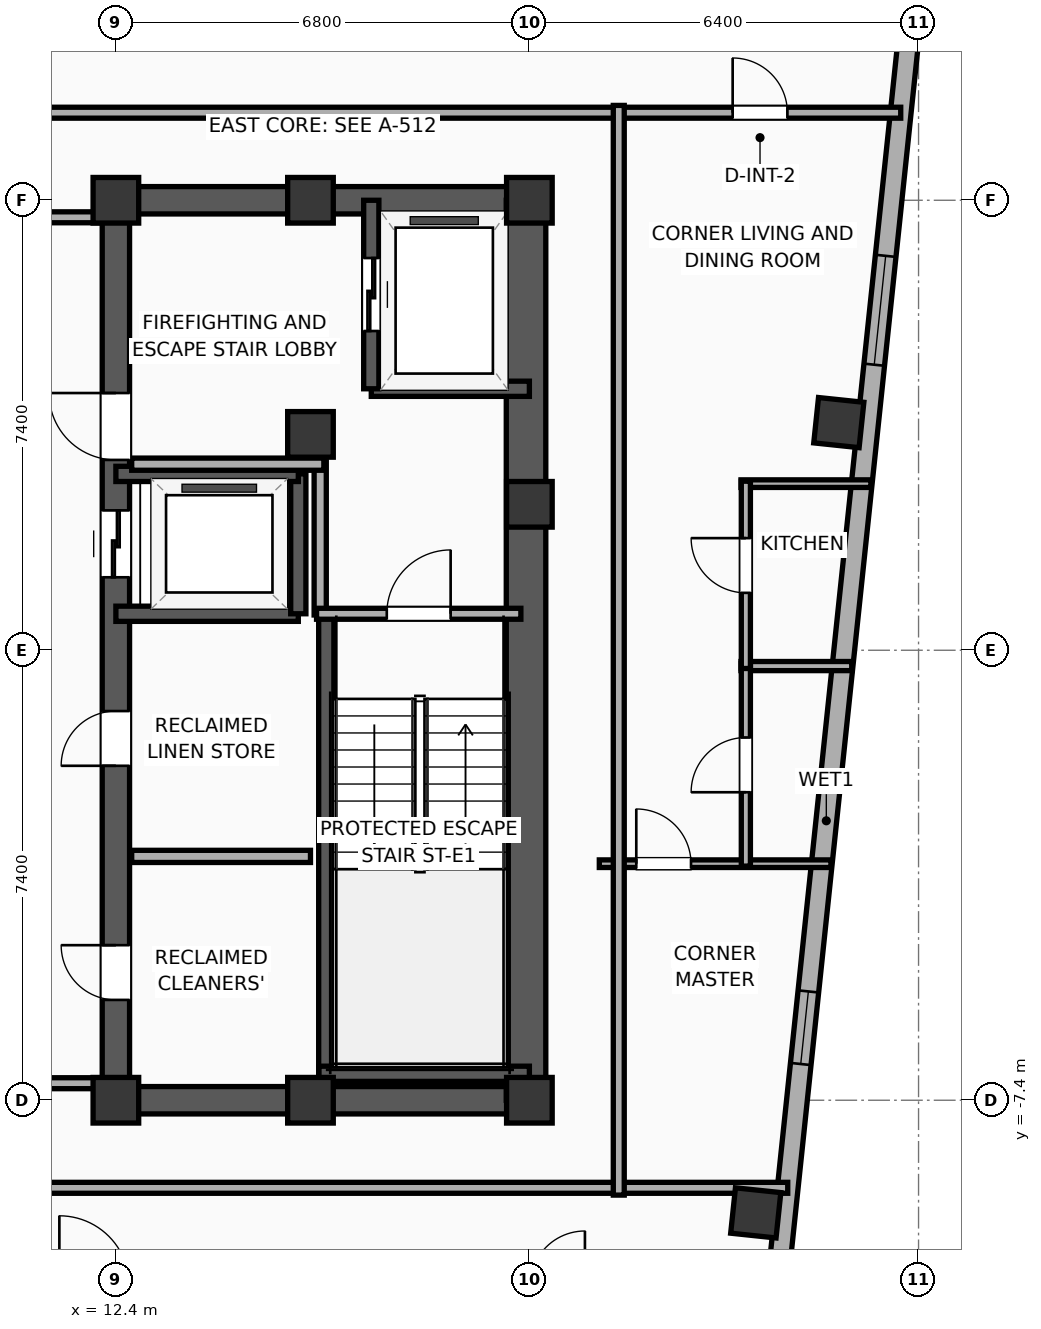
"""IFC4 building model, lengths in metres.
Left out: names, types, materials, properties, quantities, classifications, styles, units other than length and angle.
Written with IfcOpenShell. Run it as: python <this file> out.ifc"""

import sys

from ifc_helpers import new_model, si_unit, direction, frame, frame_2d, origin, origin_2d, place, context, subcontext, project, spatial, rectangle, hollow_rectangle, extrude, element, fill, save


model = new_model("IFC4")
c1 = context("Model", 3, precision=1e-05, world=origin(), true_north=direction((0.0, 1.0)))
c2 = subcontext(c1, "Body", "Model", "MODEL_VIEW")
j1 = project(units=[si_unit("LENGTHUNIT", "METRE"), si_unit("PLANEANGLEUNIT", "RADIAN")], contexts=[c1])
p1 = place(None, origin())
s1 = spatial("IfcSite", under=j1, at=p1, CompositionType="ELEMENT")
p2 = place(p1, origin())
s2 = spatial("IfcBuilding", under=s1, at=p2, CompositionType="ELEMENT")
p3 = place(p2, frame((0.0, 0.0, 263.9)))
s3 = spatial("IfcBuildingStorey", under=s2, at=p3, CompositionType="ELEMENT", Elevation=263.9)
for number, where, z_axis, x_axis in (
    (1, (12.4, -7.4, 0.0), (0.0, 0.0, 1.0), (1.0, 0.0, 0.0)),
    (2, (15.6, 3.55, 0.0), (0.0, 0.0, 1.0), (1.0, 0.0, 0.0)),
    (3, (12.4, 7.4, 0.0), (0.0, 0.0, 1.0), (1.0, 0.0, 0.0)),
    (4, (15.6, -7.4, 0.0), (0.0, 0.0, 1.0), (1.0, 0.0, 0.0)),
    (5, (15.6, 7.4, 0.0), (0.0, 0.0, 1.0), (1.0, 0.0, 0.0)),
    (6, (19.2, -7.4, 0.0), (0.0, 0.0, 1.0), (1.0, 0.0, 0.0)),
    (7, (19.2, 2.4, 0.0), (0.0, 0.0, 1.0), (1.0, 0.0, 0.0)),
    (8, (19.2, 7.4, 0.0), (0.0, 0.0, 1.0), (1.0, 0.0, 0.0)),
):
    element("IfcColumn", number, at=place(p3, frame(where, z_axis=z_axis, x_axis=x_axis)), inside=s3, PredefinedType="COLUMN", context=c2, shape_type="SweptSolid", body=[
        extrude(rectangle(XDim=0.75, YDim=0.75, at=origin_2d()), origin(), (0.0, 0.0, 1.0), 3.9),
    ])
for number, where, z_axis, x_axis in (
    (9, (12.175, -7.4, 0.0), (0.0, 0.0, 1.0), (1.0, 0.0, 0.0)),
    (10, (12.175, 7.4, 0.0), (0.0, 0.0, 1.0), (1.0, 0.0, 0.0)),
):
    element("IfcWall", number, at=place(p3, frame(where, z_axis=z_axis, x_axis=x_axis)), inside=s3, PredefinedType="SHEAR", context=c2, shape_type="SweptSolid", body=[
        extrude(rectangle(XDim=7.25, YDim=0.45, at=frame_2d((3.625, 0.0))), origin(), (0.0, 0.0, 1.0), 3.65),
    ])
p4 = place(p3, frame((12.4, -7.4, 0.0), z_axis=(0.0, 0.0, 1.0), x_axis=(0.0, 1.0, 0.0)))
e11 = element("IfcWall", 11, at=p4, inside=s3, PredefinedType="SHEAR", context=c2, shape_type="SweptSolid", body=[
    extrude(rectangle(XDim=14.8, YDim=0.45, at=frame_2d((7.4, 0.0))), origin(), (0.0, 0.0, 1.0), 3.65),
])
p5 = place(p4, frame((8.6, 0.0, 0.0)))
e12 = element("IfcOpeningElement", 12, at=p5, cuts=e11, PredefinedType="OPENING", context=c2, shape_type="SweptSolid", body=[
    extrude(rectangle(XDim=1.1, YDim=2.05, at=frame_2d((0.55, 1.025))), frame((0.0, 0.235, 0.0), z_axis=(0.0, -1.0, 0.0), x_axis=(1.0, 0.0, 0.0)), (0.0, 0.0, 1.0), 0.47),
])
p6 = place(p4, frame((10.53, 0.0, 0.0)))
e13 = element("IfcOpeningElement", 13, at=p6, cuts=e11, PredefinedType="OPENING", context=c2, shape_type="SweptSolid", body=[
    extrude(rectangle(XDim=1.1, YDim=2.05, at=frame_2d((0.55, 1.025))), frame((0.0, 0.235, 0.0), z_axis=(0.0, -1.0, 0.0), x_axis=(1.0, 0.0, 0.0)), (0.0, 0.0, 1.0), 0.47),
])
p7 = place(p4, frame((1.65, 0.0, 0.0)))
e14 = element("IfcOpeningElement", 14, at=p7, cuts=e11, PredefinedType="OPENING", context=c2, shape_type="SweptSolid", body=[
    extrude(rectangle(XDim=0.9, YDim=2.05, at=frame_2d((0.45, 1.025))), frame((0.0, 0.235, 0.0), z_axis=(0.0, -1.0, 0.0), x_axis=(1.0, 0.0, 0.0)), (0.0, 0.0, 1.0), 0.47),
])
p8 = place(p4, frame((5.5, 0.0, 0.0)))
e15 = element("IfcOpeningElement", 15, at=p8, cuts=e11, PredefinedType="OPENING", context=c2, shape_type="SweptSolid", body=[
    extrude(rectangle(XDim=0.9, YDim=2.05, at=frame_2d((0.45, 1.025))), frame((0.0, 0.235, 0.0), z_axis=(0.0, -1.0, 0.0), x_axis=(1.0, 0.0, 0.0)), (0.0, 0.0, 1.0), 0.47),
])
p9 = place(p3, frame((19.145, -7.4, 0.0), z_axis=(0.0, 0.0, 1.0), x_axis=(0.0, 1.0, 0.0)))
e16 = element("IfcWall", 16, at=p9, inside=s3, PredefinedType="SHEAR", context=c2, shape_type="SweptSolid", body=[
    extrude(rectangle(XDim=14.8, YDim=0.65, at=frame_2d((7.4, 0.0))), origin(), (0.0, 0.0, 1.0), 3.65),
])
p10 = place(p3, frame((15.86, -7.085, 0.0), z_axis=(0.0, 0.0, 1.0), x_axis=(0.0, 1.0, 0.0)))
e17 = element("IfcWall", 17, at=p10, inside=s3, PredefinedType="SOLIDWALL", context=c2, shape_type="SweptSolid", body=[
    extrude(rectangle(XDim=7.685, YDim=0.25, at=frame_2d((3.843, 0.0))), origin(), (0.0, 0.0, 1.0), 3.65),
])
p11 = place(p3, frame((15.74, -6.965, 0.0), z_axis=(0.0, 0.0, 1.0), x_axis=(1.0, 0.0, 0.0)))
e18 = element("IfcWall", 18, at=p11, inside=s3, PredefinedType="SOLIDWALL", context=c2, shape_type="SweptSolid", body=[
    extrude(rectangle(XDim=3.46, YDim=0.25, at=frame_2d((1.73, 0.0))), origin(), (0.0, 0.0, 1.0), 3.65),
])
for number, where, z_axis, x_axis in (
    (19, (22.923, -9.252, 0.0), (0.0, 0.0, 1.0), (0.995, -0.105, 0.0)),
    (20, (24.289, 3.744, 0.0), (0.0, 0.0, 1.0), (0.995, -0.105, 0.0)),
):
    element("IfcColumn", number, at=place(p3, frame(where, z_axis=z_axis, x_axis=x_axis)), inside=s3, PredefinedType="COLUMN", context=c2, shape_type="SweptSolid", body=[
        extrude(hollow_rectangle(XDim=0.75, YDim=0.75, WallThickness=0.025, at=origin_2d()), origin(), (0.0, 0.0, 1.0), 3.9),
    ])
p12 = place(p3, frame((25.67, 12.296, 0.0), z_axis=(0.0, 0.0, 1.0), x_axis=(-0.104533282919, -0.994521388791, 0.0)))
e21 = element("IfcWall", 21, at=p12, inside=s3, PredefinedType="ELEMENTEDWALL", context=c2, shape_type="SweptSolid", body=[
    extrude(rectangle(XDim=30.366, YDim=0.34, at=frame_2d((15.183, 0.0))), origin(), (0.0, 0.0, 1.0), 3.65),
])
p13 = place(p12, frame((5.842, 0.0, 0.75)))
e22 = element("IfcOpeningElement", 22, at=p13, cuts=e21, PredefinedType="OPENING", context=c2, shape_type="SweptSolid", body=[
    extrude(rectangle(XDim=1.8, YDim=2.1, at=frame_2d((0.9, 1.05))), frame((0.0, 0.18, 0.0), z_axis=(0.0, -1.0, 0.0), x_axis=(1.0, 0.0, 0.0)), (0.0, 0.0, 1.0), 0.36),
])
p14 = place(p12, frame((18.005, 0.0, 0.75)))
e23 = element("IfcOpeningElement", 23, at=p14, cuts=e21, PredefinedType="OPENING", context=c2, shape_type="SweptSolid", body=[
    extrude(rectangle(XDim=1.2, YDim=2.05, at=frame_2d((0.6, 1.025))), frame((0.0, 0.18, 0.0), z_axis=(0.0, -1.0, 0.0), x_axis=(1.0, 0.0, 0.0)), (0.0, 0.0, 1.0), 0.36),
])
p15 = place(p3, frame((16.6, 4.3, 0.0), z_axis=(0.0, 0.0, 1.0), x_axis=(1.0, 0.0, 0.0)))
e24 = element("IfcWall", 24, at=p15, inside=s3, PredefinedType="SOLIDWALL", context=c2, shape_type="SweptSolid", body=[
    extrude(rectangle(XDim=2.6, YDim=0.25, at=frame_2d((1.3, 0.0))), origin(), (0.0, 0.0, 1.0), 3.65),
])
p16 = place(p3, frame((16.6, 7.4, 0.0), z_axis=(0.0, 0.0, 1.0), x_axis=(0.0, -1.0, 0.0)))
e25 = element("IfcWall", 25, at=p16, inside=s3, PredefinedType="SOLIDWALL", context=c2, shape_type="SweptSolid", body=[
    extrude(rectangle(XDim=3.1, YDim=0.25, at=frame_2d((1.55, 0.0))), origin(), (0.0, 0.0, 1.0), 3.65),
])
p17 = place(p16, frame((0.95, 0.0, 0.0)))
e26 = element("IfcOpeningElement", 26, at=p17, cuts=e25, PredefinedType="OPENING", context=c2, shape_type="SweptSolid", body=[
    extrude(rectangle(XDim=1.2, YDim=2.05, at=frame_2d((0.6, 1.025))), frame((0.0, 0.135, 0.0), z_axis=(0.0, -1.0, 0.0), x_axis=(1.0, 0.0, 0.0)), (0.0, 0.0, 1.0), 0.27),
])
p18 = place(p3, frame((12.4, 0.6, 0.0), z_axis=(0.0, 0.0, 1.0), x_axis=(1.0, 0.0, 0.0)))
e27 = element("IfcWall", 27, at=p18, inside=s3, PredefinedType="SOLIDWALL", context=c2, shape_type="SweptSolid", body=[
    extrude(rectangle(XDim=3.0, YDim=0.25, at=frame_2d((1.5, 0.0))), origin(), (0.0, 0.0, 1.0), 3.65),
])
p19 = place(p3, frame((15.4, 0.6, 0.0), z_axis=(0.0, 0.0, 1.0), x_axis=(0.0, 1.0, 0.0)))
e28 = element("IfcWall", 28, at=p19, inside=s3, PredefinedType="SOLIDWALL", context=c2, shape_type="SweptSolid", body=[
    extrude(rectangle(XDim=2.3, YDim=0.25, at=frame_2d((1.15, 0.0))), origin(), (0.0, 0.0, 1.0), 3.65),
])
p20 = place(p3, frame((15.4, 2.9, 0.0), z_axis=(0.0, 0.0, 1.0), x_axis=(-1.0, 0.0, 0.0)))
e29 = element("IfcWall", 29, at=p20, inside=s3, PredefinedType="SOLIDWALL", context=c2, shape_type="SweptSolid", body=[
    extrude(rectangle(XDim=3.0, YDim=0.25, at=frame_2d((1.5, 0.0))), origin(), (0.0, 0.0, 1.0), 3.65),
])
p21 = place(p3, frame((15.76, 0.58, 0.0), z_axis=(0.0, 0.0, 1.0), x_axis=(0.0, 1.0, 0.0)))
e30 = element("IfcWall", 30, at=p21, inside=s3, PredefinedType="PARTITIONING", context=c2, shape_type="SweptSolid", body=[
    extrude(rectangle(XDim=2.52, YDim=0.2, at=frame_2d((1.26, 0.0))), origin(), (0.0, 0.0, 1.0), 3.65),
])
p22 = place(p3, frame((12.66, 3.06, 0.0), z_axis=(0.0, 0.0, 1.0), x_axis=(1.0, 0.0, 0.0)))
e31 = element("IfcWall", 31, at=p22, inside=s3, PredefinedType="PARTITIONING", context=c2, shape_type="SweptSolid", body=[
    extrude(rectangle(XDim=3.16, YDim=0.2, at=frame_2d((1.58, 0.0))), origin(), (0.0, 0.0, 1.0), 3.65),
])
p23 = place(p3, frame((15.7, 0.6, 0.0), z_axis=(0.0, 0.0, 1.0), x_axis=(1.0, 0.0, 0.0)))
e32 = element("IfcWall", 32, at=p23, inside=s3, PredefinedType="PARTITIONING", context=c2, shape_type="SweptSolid", body=[
    extrude(rectangle(XDim=3.36, YDim=0.18, at=frame_2d((1.68, 0.0))), origin(), (0.0, 0.0, 1.0), 3.65),
])
p24 = place(p23, frame((1.155, 0.0, 0.0)))
e33 = element("IfcOpeningElement", 33, at=p24, cuts=e32, PredefinedType="OPENING", context=c2, shape_type="SweptSolid", body=[
    extrude(rectangle(XDim=1.05, YDim=2.05, at=frame_2d((0.525, 1.025))), frame((0.0, 0.1, 0.0), z_axis=(0.0, -1.0, 0.0), x_axis=(1.0, 0.0, 0.0)), (0.0, 0.0, 1.0), 0.2),
])
p25 = place(p3, frame((12.66, -3.39, 0.0), z_axis=(0.0, 0.0, 1.0), x_axis=(1.0, 0.0, 0.0)))
e34 = element("IfcWall", 34, at=p25, inside=s3, PredefinedType="PARTITIONING", context=c2, shape_type="SweptSolid", body=[
    extrude(rectangle(XDim=2.94, YDim=0.2, at=frame_2d((1.47, 0.0))), origin(), (0.0, 0.0, 1.0), 3.65),
])
for number, where, z_axis, x_axis in (
    (35, (9.88, 7.12, 0.0), (0.0, 0.0, 1.0), (1.0, 0.0, 0.0)),
    (36, (9.88, -7.12, 0.0), (0.0, 0.0, 1.0), (1.0, 0.0, 0.0)),
):
    element("IfcWall", number, at=place(p3, frame(where, z_axis=z_axis, x_axis=x_axis)), inside=s3, PredefinedType="PARTITIONING", context=c2, shape_type="SweptSolid", body=[
        extrude(rectangle(XDim=2.27, YDim=0.18, at=frame_2d((1.135, 0.0))), origin(), (0.0, 0.0, 1.0), 3.65),
    ])
p26 = place(p3, frame((9.88, 8.84, 0.0), z_axis=(0.0, 0.0, 1.0), x_axis=(1.0, 0.0, 0.0)))
e37 = element("IfcWall", 37, at=p26, inside=s3, PredefinedType="PARTITIONING", context=c2, shape_type="SweptSolid", body=[
    extrude(rectangle(XDim=15.427, YDim=0.18, at=frame_2d((7.713, 0.0))), origin(), (0.0, 0.0, 1.0), 3.65),
])
p27 = place(p26, frame((12.663, 0.0, 0.0)))
e38 = element("IfcOpeningElement", 38, at=p27, cuts=e37, PredefinedType="OPENING", context=c2, shape_type="SweptSolid", body=[
    extrude(rectangle(XDim=0.9, YDim=2.05, at=frame_2d((0.45, 1.025))), frame((0.0, 0.1, 0.0), z_axis=(0.0, -1.0, 0.0), x_axis=(1.0, 0.0, 0.0)), (0.0, 0.0, 1.0), 0.2),
])
p28 = place(p3, frame((9.88, -8.84, 0.0), z_axis=(0.0, 0.0, 1.0), x_axis=(1.0, 0.0, 0.0)))
e39 = element("IfcWall", 39, at=p28, inside=s3, PredefinedType="PARTITIONING", context=c2, shape_type="SweptSolid", body=[
    extrude(rectangle(XDim=13.569, YDim=0.18, at=frame_2d((6.784, 0.0))), origin(), (0.0, 0.0, 1.0), 3.65),
])
p29 = place(p3, frame((22.68, 2.74, 0.0), z_axis=(0.0, 0.0, 1.0), x_axis=(1.0, 0.0, 0.0)))
e40 = element("IfcWall", 40, at=p29, inside=s3, PredefinedType="PARTITIONING", context=c2, shape_type="SweptSolid", body=[
    extrude(rectangle(XDim=2.137, YDim=0.125, at=frame_2d((1.068, 0.0))), origin(), (0.0, 0.0, 1.0), 3.65),
])
p30 = place(p3, frame((22.68, -0.26, 0.0), z_axis=(0.0, 0.0, 1.0), x_axis=(1.0, 0.0, 0.0)))
e41 = element("IfcWall", 41, at=p30, inside=s3, PredefinedType="PLUMBINGWALL", context=c2, shape_type="SweptSolid", body=[
    extrude(rectangle(XDim=1.821, YDim=0.15, at=frame_2d((0.911, 0.0))), origin(), (0.0, 0.0, 1.0), 3.65),
])
p31 = place(p3, frame((20.35, -3.51, 0.0), z_axis=(0.0, 0.0, 1.0), x_axis=(1.0, 0.0, 0.0)))
e42 = element("IfcWall", 42, at=p31, inside=s3, PredefinedType="PARTITIONING", context=c2, shape_type="SweptSolid", body=[
    extrude(rectangle(XDim=3.81, YDim=0.125, at=frame_2d((1.905, 0.0))), origin(), (0.0, 0.0, 1.0), 3.65),
])
p32 = place(p31, frame((0.608, 0.0, 0.0)))
e43 = element("IfcOpeningElement", 43, at=p32, cuts=e42, PredefinedType="OPENING", context=c2, shape_type="SweptSolid", body=[
    extrude(rectangle(XDim=0.9, YDim=2.05, at=frame_2d((0.45, 1.025))), frame((0.0, 0.073, 0.0), z_axis=(0.0, -1.0, 0.0), x_axis=(1.0, 0.0, 0.0)), (0.0, 0.0, 1.0), 0.145),
])
p33 = place(p3, frame((22.76, -3.55, 0.0), z_axis=(0.0, 0.0, 1.0), x_axis=(0.0, 1.0, 0.0)))
e44 = element("IfcWall", 44, at=p33, inside=s3, PredefinedType="PLUMBINGWALL", context=c2, shape_type="SweptSolid", body=[
    extrude(rectangle(XDim=3.33, YDim=0.15, at=frame_2d((1.665, 0.0))), origin(), (0.0, 0.0, 1.0), 3.65),
])
p34 = place(p33, frame((1.215, 0.0, 0.0)))
e45 = element("IfcOpeningElement", 45, at=p34, cuts=e44, PredefinedType="OPENING", context=c2, shape_type="SweptSolid", body=[
    extrude(rectangle(XDim=0.9, YDim=2.05, at=frame_2d((0.45, 1.025))), frame((0.0, 0.085, 0.0), z_axis=(0.0, -1.0, 0.0), x_axis=(1.0, 0.0, 0.0)), (0.0, 0.0, 1.0), 0.17),
])
p35 = place(p3, frame((22.76, -0.3, 0.0), z_axis=(0.0, 0.0, 1.0), x_axis=(0.0, 1.0, 0.0)))
e46 = element("IfcWall", 46, at=p35, inside=s3, PredefinedType="PLUMBINGWALL", context=c2, shape_type="SweptSolid", body=[
    extrude(rectangle(XDim=3.08, YDim=0.15, at=frame_2d((1.54, 0.0))), origin(), (0.0, 0.0, 1.0), 3.65),
])
p36 = place(p35, frame((1.244, 0.0, 0.0)))
e47 = element("IfcOpeningElement", 47, at=p36, cuts=e46, PredefinedType="OPENING", context=c2, shape_type="SweptSolid", body=[
    extrude(rectangle(XDim=0.9, YDim=2.05, at=frame_2d((0.45, 1.025))), frame((0.0, 0.085, 0.0), z_axis=(0.0, -1.0, 0.0), x_axis=(1.0, 0.0, 0.0)), (0.0, 0.0, 1.0), 0.17),
])
p37 = place(p3, frame((20.67, -8.96, 0.0), z_axis=(0.0, 0.0, 1.0), x_axis=(0.0, 1.0, 0.0)))
e48 = element("IfcWall", 48, at=p37, inside=s3, PredefinedType="PARTITIONING", context=c2, shape_type="SweptSolid", body=[
    extrude(rectangle(XDim=17.92, YDim=0.18, at=frame_2d((8.96, 0.0))), origin(), (0.0, 0.0, 1.0), 3.65),
])
p38 = place(p13, origin())
e49 = element("IfcWindow", 49, at=p38, inside=s3, PartitioningType="SINGLE_PANEL", PredefinedType="WINDOW", context=c2, shape_type="SweptSolid", body=[
    extrude(rectangle(XDim=1.8, YDim=2.1, at=frame_2d((0.9, 1.05))), frame((0.0, 0.03, 0.0), z_axis=(0.0, -1.0, 0.0), x_axis=(1.0, 0.0, 0.0)), (0.0, 0.0, 1.0), 0.06),
])
fill(e22, e49)
p39 = place(p14, origin())
e50 = element("IfcWindow", 50, at=p39, inside=s3, PartitioningType="SINGLE_PANEL", PredefinedType="WINDOW", context=c2, shape_type="SweptSolid", body=[
    extrude(rectangle(XDim=1.2, YDim=2.05, at=frame_2d((0.6, 1.025))), frame((0.0, 0.03, 0.0), z_axis=(0.0, -1.0, 0.0), x_axis=(1.0, 0.0, 0.0)), (0.0, 0.0, 1.0), 0.06),
])
fill(e23, e50)
p40 = place(p17, origin())
e51 = element("IfcDoor", 51, at=p40, inside=s3, OperationType="SLIDING_TO_LEFT", PredefinedType="DOOR", context=c2, shape_type="SweptSolid", body=[
    extrude(rectangle(XDim=1.2, YDim=2.05, at=frame_2d((0.6, 1.025))), frame((0.0, 0.025, 0.0), z_axis=(0.0, -1.0, 0.0), x_axis=(1.0, 0.0, 0.0)), (0.0, 0.0, 1.0), 0.05),
])
fill(e26, e51)
p41 = place(p5, origin())
e52 = element("IfcDoor", 52, at=p41, inside=s3, OperationType="SLIDING_TO_LEFT", PredefinedType="DOOR", context=c2, shape_type="SweptSolid", body=[
    extrude(rectangle(XDim=1.1, YDim=2.05, at=frame_2d((0.55, 1.025))), frame((0.0, 0.025, 0.0), z_axis=(0.0, -1.0, 0.0), x_axis=(1.0, 0.0, 0.0)), (0.0, 0.0, 1.0), 0.05),
])
fill(e12, e52)
p42 = place(p24, origin())
e53 = element("IfcDoor", 53, at=p42, inside=s3, OperationType="SINGLE_SWING_RIGHT", PredefinedType="DOOR", context=c2, shape_type="SweptSolid", body=[
    extrude(rectangle(XDim=1.05, YDim=2.05, at=frame_2d((0.525, 1.025))), frame((0.0, 0.025, 0.0), z_axis=(0.0, -1.0, 0.0), x_axis=(1.0, 0.0, 0.0)), (0.0, 0.0, 1.0), 0.05),
])
fill(e33, e53)
p43 = place(p27, origin())
e54 = element("IfcDoor", 54, at=p43, inside=s3, OperationType="SINGLE_SWING_LEFT", PredefinedType="DOOR", context=c2, shape_type="SweptSolid", body=[
    extrude(rectangle(XDim=0.9, YDim=2.05, at=frame_2d((0.45, 1.025))), frame((0.0, 0.025, 0.0), z_axis=(0.0, -1.0, 0.0), x_axis=(1.0, 0.0, 0.0)), (0.0, 0.0, 1.0), 0.05),
])
fill(e38, e54)
p44 = place(p32, origin())
e55 = element("IfcDoor", 55, at=p44, inside=s3, OperationType="SINGLE_SWING_LEFT", PredefinedType="DOOR", context=c2, shape_type="SweptSolid", body=[
    extrude(rectangle(XDim=0.9, YDim=2.05, at=frame_2d((0.45, 1.025))), frame((0.0, 0.025, 0.0), z_axis=(0.0, -1.0, 0.0), x_axis=(1.0, 0.0, 0.0)), (0.0, 0.0, 1.0), 0.05),
])
fill(e43, e55)
p45 = place(p34, origin())
e56 = element("IfcDoor", 56, at=p45, inside=s3, OperationType="SINGLE_SWING_LEFT", PredefinedType="DOOR", context=c2, shape_type="SweptSolid", body=[
    extrude(rectangle(XDim=0.9, YDim=2.05, at=frame_2d((0.45, 1.025))), frame((0.0, 0.025, 0.0), z_axis=(0.0, -1.0, 0.0), x_axis=(1.0, 0.0, 0.0)), (0.0, 0.0, 1.0), 0.05),
])
fill(e45, e56)
p46 = place(p36, origin())
e57 = element("IfcDoor", 57, at=p46, inside=s3, OperationType="SINGLE_SWING_RIGHT", PredefinedType="DOOR", context=c2, shape_type="SweptSolid", body=[
    extrude(rectangle(XDim=0.9, YDim=2.05, at=frame_2d((0.45, 1.025))), frame((0.0, 0.025, 0.0), z_axis=(0.0, -1.0, 0.0), x_axis=(1.0, 0.0, 0.0)), (0.0, 0.0, 1.0), 0.05),
])
fill(e47, e57)
p47 = place(p6, origin())
e58 = element("IfcDoor", 58, at=p47, inside=s3, OperationType="SINGLE_SWING_RIGHT", PredefinedType="DOOR", context=c2, shape_type="SweptSolid", body=[
    extrude(rectangle(XDim=1.1, YDim=2.05, at=frame_2d((0.55, 1.025))), frame((0.0, 0.025, 0.0), z_axis=(0.0, -1.0, 0.0), x_axis=(1.0, 0.0, 0.0)), (0.0, 0.0, 1.0), 0.05),
])
fill(e13, e58)
p48 = place(p7, origin())
e59 = element("IfcDoor", 59, at=p48, inside=s3, OperationType="SINGLE_SWING_RIGHT", PredefinedType="DOOR", context=c2, shape_type="SweptSolid", body=[
    extrude(rectangle(XDim=0.9, YDim=2.05, at=frame_2d((0.45, 1.025))), frame((0.0, 0.025, 0.0), z_axis=(0.0, -1.0, 0.0), x_axis=(1.0, 0.0, 0.0)), (0.0, 0.0, 1.0), 0.05),
])
fill(e14, e59)
p49 = place(p8, origin())
e60 = element("IfcDoor", 60, at=p49, inside=s3, OperationType="SINGLE_SWING_LEFT", PredefinedType="DOOR", context=c2, shape_type="SweptSolid", body=[
    extrude(rectangle(XDim=0.9, YDim=2.05, at=frame_2d((0.45, 1.025))), frame((0.0, 0.025, 0.0), z_axis=(0.0, -1.0, 0.0), x_axis=(1.0, 0.0, 0.0)), (0.0, 0.0, 1.0), 0.05),
])
fill(e15, e60)
save(model, sys.argv[1])
